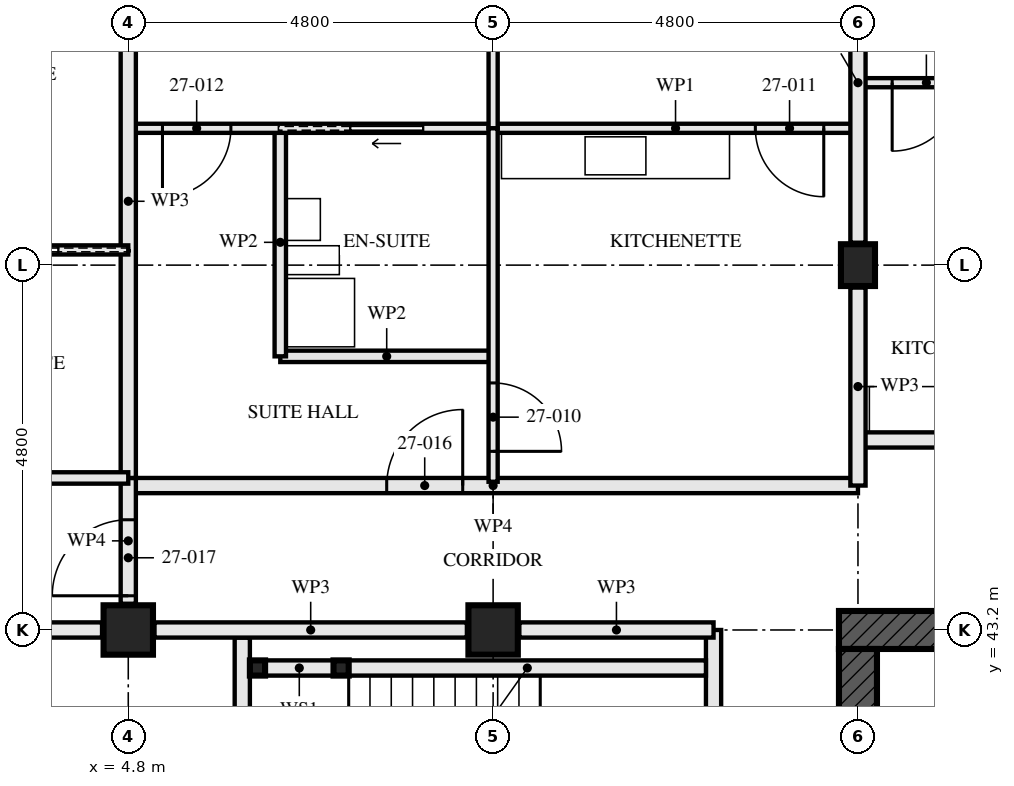
"""IFC4 building model, lengths in metres.
Left out: names, types, materials, properties, quantities, classifications, styles, units other than length and angle.
Written with IfcOpenShell. Run it as: python <this file> out.ifc"""

import sys

from ifc_helpers import new_model, si_unit, direction, frame, frame_2d, origin, origin_2d, place, context, subcontext, project, spatial, rectangle, hollow_rectangle, i_section, extrude, element, fill, save


model = new_model("IFC4")
c1 = context("Model", 3, precision=1e-05, world=origin(), true_north=direction((0.0, 1.0)))
c2 = subcontext(c1, "Body", "Model", "MODEL_VIEW")
j1 = project(units=[si_unit("LENGTHUNIT", "METRE"), si_unit("PLANEANGLEUNIT", "RADIAN")], contexts=[c1])
p1 = place(None, origin())
s1 = spatial("IfcSite", under=j1, at=p1, CompositionType="ELEMENT")
p2 = place(p1, origin())
s2 = spatial("IfcBuilding", under=s1, at=p2, CompositionType="ELEMENT")
p3 = place(p2, frame((0.0, 0.0, 101.5)))
s3 = spatial("IfcBuildingStorey", under=s2, at=p3, CompositionType="ELEMENT", Elevation=101.5)
for number, where, z_axis, x_axis in (
    (1, (4.8, 43.2, 0.0), (0.0, 0.0, 1.0), (0.0, 1.0, 0.0)),
    (2, (9.6, 43.2, 0.0), (0.0, 0.0, 1.0), (0.0, 1.0, 0.0)),
):
    element("IfcColumn", number, at=place(p3, frame(where, z_axis=z_axis, x_axis=x_axis)), inside=s3, PredefinedType="COLUMN", context=c2, shape_type="SweptSolid", body=[
        extrude(hollow_rectangle(XDim=0.65, YDim=0.65, WallThickness=0.05, at=origin_2d()), origin(), (0.0, 0.0, 1.0), 3.5),
    ])
p4 = place(p3, frame((14.4, 48.0, 0.0), z_axis=(0.0, 0.0, 1.0), x_axis=(1.0, 0.0, 0.0)))
e3 = element("IfcColumn", 3, at=p4, inside=s3, PredefinedType="COLUMN", context=c2, shape_type="SweptSolid", body=[
    extrude(i_section(OverallWidth=0.448, OverallDepth=0.55, WebThickness=0.072, FlangeThickness=0.115, FilletRadius=0.015, at=origin_2d()), origin(), (0.0, 0.0, 1.0), 3.5),
])
p5 = place(p3, frame((29.05, 43.2, -0.17), z_axis=(0.0, 0.0, 1.0), x_axis=(-1.0, 0.0, 0.0)))
e4 = element("IfcWall", 4, at=p5, inside=s3, PredefinedType="SHEAR", context=c2, shape_type="SweptSolid", body=[
    extrude(rectangle(XDim=14.9, YDim=0.5, at=frame_2d((7.45, 0.0))), origin(), (0.0, 0.0, 1.0), 3.5),
])
p6 = place(p5, frame((6.85, 0.0, 0.17)))
e5 = element("IfcOpeningElement", 5, at=p6, cuts=e4, PredefinedType="OPENING", context=c2, shape_type="SweptSolid", body=[
    extrude(rectangle(XDim=1.2, YDim=2.1, at=frame_2d((0.6, 1.05))), frame((0.0, 0.26, 0.0), z_axis=(0.0, -1.0, 0.0), x_axis=(1.0, 0.0, 0.0)), (0.0, 0.0, 1.0), 0.521),
])
p7 = place(p3, frame((14.4, 42.95, -0.17), z_axis=(0.0, 0.0, 1.0), x_axis=(0.0, -1.0, 0.0)))
e6 = element("IfcWall", 6, at=p7, inside=s3, PredefinedType="SHEAR", context=c2, shape_type="SweptSolid", body=[
    extrude(rectangle(XDim=13.9, YDim=0.5, at=frame_2d((6.95, 0.0))), origin(), (0.0, 0.0, 1.0), 3.5),
])
p8 = place(p7, frame((6.35, 0.0, 0.17)))
e7 = element("IfcOpeningElement", 7, at=p8, cuts=e6, PredefinedType="OPENING", context=c2, shape_type="SweptSolid", body=[
    extrude(rectangle(XDim=1.2, YDim=2.1, at=frame_2d((0.6, 1.05))), frame((0.0, 0.26, 0.0), z_axis=(0.0, -1.0, 0.0), x_axis=(1.0, 0.0, 0.0)), (0.0, 0.0, 1.0), 0.521),
])
for number, where, z_axis, x_axis in (
    (8, (6.5, 42.7, 0.0), (0.0, 0.0, 1.0), (1.0, 0.0, 0.0)),
    (9, (7.6, 42.7, 0.0), (0.0, 0.0, 1.0), (1.0, 0.0, 0.0)),
):
    element("IfcColumn", number, at=place(p3, frame(where, z_axis=z_axis, x_axis=x_axis)), inside=s3, PredefinedType="COLUMN", context=c2, shape_type="SweptSolid", body=[
        extrude(hollow_rectangle(XDim=0.2, YDim=0.2, WallThickness=0.008, at=origin_2d()), origin(), (0.0, 0.0, 1.0), 3.33),
    ])
p9 = place(p3, frame((6.6, 42.7, 0.0), z_axis=(0.0, 0.0, 1.0), x_axis=(1.0, 0.0, 0.0)))
e10 = element("IfcWall", 10, at=p9, inside=s3, PredefinedType="SOLIDWALL", context=c2, shape_type="SweptSolid", body=[
    extrude(rectangle(XDim=0.9, YDim=0.2, at=frame_2d((0.45, 0.0))), origin(), (0.0, 0.0, 1.0), 2.99),
])
p10 = place(p3, frame((7.7, 42.7, 0.0), z_axis=(0.0, 0.0, 1.0), x_axis=(1.0, 0.0, 0.0)))
e11 = element("IfcWall", 11, at=p10, inside=s3, PredefinedType="SOLIDWALL", context=c2, shape_type="SweptSolid", body=[
    extrude(rectangle(XDim=4.7, YDim=0.2, at=frame_2d((2.35, 0.0))), origin(), (0.0, 0.0, 1.0), 2.99),
])
p11 = place(p3, frame((6.3, 43.1, 0.0), z_axis=(0.0, 0.0, 1.0), x_axis=(0.0, -1.0, 0.0)))
e12 = element("IfcWall", 12, at=p11, inside=s3, PredefinedType="SOLIDWALL", context=c2, shape_type="SweptSolid", body=[
    extrude(rectangle(XDim=3.3, YDim=0.2, at=frame_2d((1.65, 0.0))), origin(), (0.0, 0.0, 1.0), 3.33),
])
p12 = place(p3, frame((12.5, 43.2, 0.0), z_axis=(0.0, 0.0, 1.0), x_axis=(0.0, -1.0, 0.0)))
e13 = element("IfcWall", 13, at=p12, inside=s3, PredefinedType="PARTITIONING", context=c2, shape_type="SweptSolid", body=[
    extrude(rectangle(XDim=14.84, YDim=0.2, at=frame_2d((7.42, 0.0))), origin(), (0.0, 0.0, 1.0), 2.32),
])
p13 = place(p12, frame((1.4, 0.0, 0.0)))
e14 = element("IfcOpeningElement", 14, at=p13, cuts=e13, PredefinedType="OPENING", context=c2, shape_type="SweptSolid", body=[
    extrude(rectangle(XDim=1.0, YDim=2.1, at=frame_2d((0.5, 1.05))), frame((0.0, 0.111, 0.0), z_axis=(0.0, -1.0, 0.0), x_axis=(1.0, 0.0, 0.0)), (0.0, 0.0, 1.0), 0.221),
])
p14 = place(p12, frame((5.2, 0.0, 0.0)))
e15 = element("IfcOpeningElement", 15, at=p14, cuts=e13, PredefinedType="OPENING", context=c2, shape_type="SweptSolid", body=[
    extrude(rectangle(XDim=1.0, YDim=2.1, at=frame_2d((0.5, 1.05))), frame((0.0, 0.111, 0.0), z_axis=(0.0, -1.0, 0.0), x_axis=(1.0, 0.0, 0.0)), (0.0, 0.0, 1.0), 0.221),
])
p15 = place(p12, frame((13.0, 0.0, 0.0)))
e16 = element("IfcOpeningElement", 16, at=p15, cuts=e13, PredefinedType="OPENING", context=c2, shape_type="SweptSolid", body=[
    extrude(rectangle(XDim=1.0, YDim=2.1, at=frame_2d((0.5, 1.05))), frame((0.0, 0.111, 0.0), z_axis=(0.0, -1.0, 0.0), x_axis=(1.0, 0.0, 0.0)), (0.0, 0.0, 1.0), 0.221),
])
p16 = place(p3, frame((6.8, 49.8, 0.0), z_axis=(0.0, 0.0, 1.0), x_axis=(0.0, -1.0, 0.0)))
e17 = element("IfcWall", 17, at=p16, inside=s3, PredefinedType="PARTITIONING", context=c2, shape_type="SweptSolid", body=[
    extrude(rectangle(XDim=3.0, YDim=0.15, at=frame_2d((1.5, 0.0))), origin(), (0.0, 0.0, 1.0), 2.55),
])
p17 = place(p3, frame((9.6, 46.8, 0.0), z_axis=(0.0, 0.0, 1.0), x_axis=(-1.0, 0.0, 0.0)))
e18 = element("IfcWall", 18, at=p17, inside=s3, PredefinedType="PARTITIONING", context=c2, shape_type="SweptSolid", body=[
    extrude(rectangle(XDim=2.8, YDim=0.15, at=frame_2d((1.4, 0.0))), origin(), (0.0, 0.0, 1.0), 3.33),
])
p18 = place(p3, frame((9.6, 49.8, 0.0), z_axis=(0.0, 0.0, 1.0), x_axis=(0.0, -1.0, 0.0)))
e19 = element("IfcWall", 19, at=p18, inside=s3, PredefinedType="PARTITIONING", context=c2, shape_type="SweptSolid", body=[
    extrude(rectangle(XDim=4.65, YDim=0.12, at=frame_2d((2.325, 0.0))), origin(), (0.0, 0.0, 1.0), 2.55),
])
p19 = place(p18, frame((3.35, 0.0, 0.0)))
e20 = element("IfcOpeningElement", 20, at=p19, cuts=e19, PredefinedType="OPENING", context=c2, shape_type="SweptSolid", body=[
    extrude(rectangle(XDim=0.9, YDim=2.1, at=frame_2d((0.45, 1.05))), frame((0.0, 0.071, 0.0), z_axis=(0.0, -1.0, 0.0), x_axis=(1.0, 0.0, 0.0)), (0.0, 0.0, 1.0), 0.141),
])
p20 = place(p3, frame((14.4, 49.8, 0.0), z_axis=(0.0, 0.0, 1.0), x_axis=(-1.0, 0.0, 0.0)))
e21 = element("IfcWall", 21, at=p20, inside=s3, PredefinedType="PARTITIONING", context=c2, shape_type="SweptSolid", body=[
    extrude(rectangle(XDim=4.8, YDim=0.12, at=frame_2d((2.4, 0.0))), origin(), (0.0, 0.0, 1.0), 3.33),
])
p21 = place(p20, frame((0.45, 0.0, 0.0)))
e22 = element("IfcOpeningElement", 22, at=p21, cuts=e21, PredefinedType="OPENING", context=c2, shape_type="SweptSolid", body=[
    extrude(rectangle(XDim=0.9, YDim=2.1, at=frame_2d((0.45, 1.05))), frame((0.0, 0.071, 0.0), z_axis=(0.0, -1.0, 0.0), x_axis=(1.0, 0.0, 0.0)), (0.0, 0.0, 1.0), 0.141),
])
p22 = place(p3, frame((9.6, 49.8, 0.0), z_axis=(0.0, 0.0, 1.0), x_axis=(-1.0, 0.0, 0.0)))
e23 = element("IfcWall", 23, at=p22, inside=s3, PredefinedType="PARTITIONING", context=c2, shape_type="SweptSolid", body=[
    extrude(rectangle(XDim=4.8, YDim=0.12, at=frame_2d((2.4, 0.0))), origin(), (0.0, 0.0, 1.0), 3.33),
])
p23 = place(p22, frame((3.45, 0.0, 0.0)))
e24 = element("IfcOpeningElement", 24, at=p23, cuts=e23, PredefinedType="OPENING", context=c2, shape_type="SweptSolid", body=[
    extrude(rectangle(XDim=0.9, YDim=2.1, at=frame_2d((0.45, 1.05))), frame((0.0, 0.071, 0.0), z_axis=(0.0, -1.0, 0.0), x_axis=(1.0, 0.0, 0.0)), (0.0, 0.0, 1.0), 0.141),
])
p24 = place(p22, frame((0.925, 0.0, 0.0)))
e25 = element("IfcOpeningElement", 25, at=p24, cuts=e23, PredefinedType="OPENING", context=c2, shape_type="SweptSolid", body=[
    extrude(rectangle(XDim=0.95, YDim=2.1, at=frame_2d((0.475, 1.05))), frame((0.0, 0.071, 0.0), z_axis=(0.0, -1.0, 0.0), x_axis=(1.0, 0.0, 0.0)), (0.0, 0.0, 1.0), 0.141),
])
p25 = place(p3, frame((9.6, 57.353, 0.0), z_axis=(0.0, 0.0, 1.0), x_axis=(0.0, -1.0, 0.0)))
e26 = element("IfcWall", 26, at=p25, inside=s3, PredefinedType="PARTITIONING", context=c2, shape_type="SweptSolid", body=[
    extrude(rectangle(XDim=7.553, YDim=0.12, at=frame_2d((3.776, 0.0))), origin(), (0.0, 0.0, 1.0), 2.55),
])
p26 = place(p3, frame((4.8, 52.48, 0.0), z_axis=(0.0, 0.0, 1.0), x_axis=(0.0, -1.0, 0.0)))
e27 = element("IfcWall", 27, at=p26, inside=s3, PredefinedType="PARTITIONING", context=c2, shape_type="SweptSolid", body=[
    extrude(rectangle(XDim=7.28, YDim=0.2, at=frame_2d((3.64, 0.0))), origin(), (0.0, 0.0, 1.0), 2.55),
])
p27 = place(p3, frame((4.8, 45.2, 0.0), z_axis=(0.0, 0.0, 1.0), x_axis=(-1.0, 0.0, 0.0)))
e28 = element("IfcWall", 28, at=p27, inside=s3, PredefinedType="PARTITIONING", context=c2, shape_type="SweptSolid", body=[
    extrude(rectangle(XDim=2.8, YDim=0.15, at=frame_2d((1.4, 0.0))), origin(), (0.0, 0.0, 1.0), 3.33),
])
p28 = place(p3, frame((4.8, 48.2, 0.0), z_axis=(0.0, 0.0, 1.0), x_axis=(-1.0, 0.0, 0.0)))
e29 = element("IfcWall", 29, at=p28, inside=s3, PredefinedType="PARTITIONING", context=c2, shape_type="SweptSolid", body=[
    extrude(rectangle(XDim=4.553, YDim=0.12, at=frame_2d((2.276, 0.0))), origin(), (0.0, 0.0, 1.0), 3.33),
])
p29 = place(p28, frame((2.975, 0.0, 0.0)))
e30 = element("IfcOpeningElement", 30, at=p29, cuts=e29, PredefinedType="OPENING", context=c2, shape_type="SweptSolid", body=[
    extrude(rectangle(XDim=0.9, YDim=2.1, at=frame_2d((0.45, 1.05))), frame((0.0, 0.071, 0.0), z_axis=(0.0, -1.0, 0.0), x_axis=(1.0, 0.0, 0.0)), (0.0, 0.0, 1.0), 0.141),
])
p30 = place(p28, frame((0.925, 0.0, 0.0)))
e31 = element("IfcOpeningElement", 31, at=p30, cuts=e29, PredefinedType="OPENING", context=c2, shape_type="SweptSolid", body=[
    extrude(rectangle(XDim=0.95, YDim=2.1, at=frame_2d((0.475, 1.05))), frame((0.0, 0.071, 0.0), z_axis=(0.0, -1.0, 0.0), x_axis=(1.0, 0.0, 0.0)), (0.0, 0.0, 1.0), 0.141),
])
p31 = place(p3, frame((14.4, 45.1, 0.0), z_axis=(0.0, 0.0, 1.0), x_axis=(-1.0, 0.0, 0.0)))
e32 = element("IfcWall", 32, at=p31, inside=s3, PredefinedType="PARTITIONING", context=c2, shape_type="SweptSolid", body=[
    extrude(rectangle(XDim=9.6, YDim=0.2, at=frame_2d((4.8, 0.0))), origin(), (0.0, 0.0, 1.0), 3.33),
])
p32 = place(p31, frame((5.2, 0.0, 0.0)))
e33 = element("IfcOpeningElement", 33, at=p32, cuts=e32, PredefinedType="OPENING", context=c2, shape_type="SweptSolid", body=[
    extrude(rectangle(XDim=1.0, YDim=2.1, at=frame_2d((0.5, 1.05))), frame((0.0, 0.111, 0.0), z_axis=(0.0, -1.0, 0.0), x_axis=(1.0, 0.0, 0.0)), (0.0, 0.0, 1.0), 0.221),
])
p33 = place(p3, frame((4.8, 45.2, 0.0), z_axis=(0.0, 0.0, 1.0), x_axis=(0.0, -1.0, 0.0)))
e34 = element("IfcWall", 34, at=p33, inside=s3, PredefinedType="PARTITIONING", context=c2, shape_type="SweptSolid", body=[
    extrude(rectangle(XDim=1.655, YDim=0.2, at=frame_2d((0.828, 0.0))), origin(), (0.0, 0.0, 1.0), 3.33),
])
p34 = place(p33, frame((0.55, 0.0, 0.0)))
e35 = element("IfcOpeningElement", 35, at=p34, cuts=e34, PredefinedType="OPENING", context=c2, shape_type="SweptSolid", body=[
    extrude(rectangle(XDim=1.0, YDim=2.1, at=frame_2d((0.5, 1.05))), frame((0.0, 0.111, 0.0), z_axis=(0.0, -1.0, 0.0), x_axis=(1.0, 0.0, 0.0)), (0.0, 0.0, 1.0), 0.221),
])
p35 = place(p3, frame((19.2, 50.4, 0.0), z_axis=(0.0, 0.0, 1.0), x_axis=(-1.0, 0.0, 0.0)))
e36 = element("IfcWall", 36, at=p35, inside=s3, PredefinedType="PARTITIONING", context=c2, shape_type="SweptSolid", body=[
    extrude(rectangle(XDim=4.8, YDim=0.12, at=frame_2d((2.4, 0.0))), origin(), (0.0, 0.0, 1.0), 3.33),
])
p36 = place(p35, frame((3.45, 0.0, 0.0)))
e37 = element("IfcOpeningElement", 37, at=p36, cuts=e36, PredefinedType="OPENING", context=c2, shape_type="SweptSolid", body=[
    extrude(rectangle(XDim=0.9, YDim=2.1, at=frame_2d((0.45, 1.05))), frame((0.0, 0.071, 0.0), z_axis=(0.0, -1.0, 0.0), x_axis=(1.0, 0.0, 0.0)), (0.0, 0.0, 1.0), 0.141),
])
p37 = place(p35, frame((0.925, 0.0, 0.0)))
e38 = element("IfcOpeningElement", 38, at=p37, cuts=e36, PredefinedType="OPENING", context=c2, shape_type="SweptSolid", body=[
    extrude(rectangle(XDim=0.95, YDim=2.1, at=frame_2d((0.475, 1.05))), frame((0.0, 0.071, 0.0), z_axis=(0.0, -1.0, 0.0), x_axis=(1.0, 0.0, 0.0)), (0.0, 0.0, 1.0), 0.141),
])
p38 = place(p3, frame((29.24, 45.7, 0.0), z_axis=(0.0, 0.0, 1.0), x_axis=(-1.0, 0.0, 0.0)))
e39 = element("IfcWall", 39, at=p38, inside=s3, PredefinedType="PARTITIONING", context=c2, shape_type="SweptSolid", body=[
    extrude(rectangle(XDim=14.84, YDim=0.2, at=frame_2d((7.42, 0.0))), origin(), (0.0, 0.0, 1.0), 2.32),
])
p39 = place(p38, frame((0.84, 0.0, 0.0)))
e40 = element("IfcOpeningElement", 40, at=p39, cuts=e39, PredefinedType="OPENING", context=c2, shape_type="SweptSolid", body=[
    extrude(rectangle(XDim=1.0, YDim=2.1, at=frame_2d((0.5, 1.05))), frame((0.0, 0.111, 0.0), z_axis=(0.0, -1.0, 0.0), x_axis=(1.0, 0.0, 0.0)), (0.0, 0.0, 1.0), 0.221),
])
p40 = place(p38, frame((5.64, 0.0, 0.0)))
e41 = element("IfcOpeningElement", 41, at=p40, cuts=e39, PredefinedType="OPENING", context=c2, shape_type="SweptSolid", body=[
    extrude(rectangle(XDim=1.0, YDim=2.1, at=frame_2d((0.5, 1.05))), frame((0.0, 0.111, 0.0), z_axis=(0.0, -1.0, 0.0), x_axis=(1.0, 0.0, 0.0)), (0.0, 0.0, 1.0), 0.221),
])
p41 = place(p38, frame((10.44, 0.0, 0.0)))
e42 = element("IfcOpeningElement", 42, at=p41, cuts=e39, PredefinedType="OPENING", context=c2, shape_type="SweptSolid", body=[
    extrude(rectangle(XDim=1.0, YDim=2.1, at=frame_2d((0.5, 1.05))), frame((0.0, 0.111, 0.0), z_axis=(0.0, -1.0, 0.0), x_axis=(1.0, 0.0, 0.0)), (0.0, 0.0, 1.0), 0.221),
])
p42 = place(p3, frame((12.5, 43.2, 0.0), z_axis=(0.0, 0.0, 1.0), x_axis=(-1.0, 0.0, 0.0)))
e43 = element("IfcWall", 43, at=p42, inside=s3, PredefinedType="PARTITIONING", context=c2, shape_type="SweptSolid", body=[
    extrude(rectangle(XDim=2.555, YDim=0.2, at=frame_2d((1.277, 0.0))), origin(), (0.0, 0.0, 1.0), 2.32),
])
p43 = place(p3, frame((9.255, 43.2, 0.0), z_axis=(0.0, 0.0, 1.0), x_axis=(-1.0, 0.0, 0.0)))
e44 = element("IfcWall", 44, at=p43, inside=s3, PredefinedType="PARTITIONING", context=c2, shape_type="SweptSolid", body=[
    extrude(rectangle(XDim=4.11, YDim=0.2, at=frame_2d((2.055, 0.0))), origin(), (0.0, 0.0, 1.0), 2.32),
])
p44 = place(p3, frame((4.455, 43.2, 0.0), z_axis=(0.0, 0.0, 1.0), x_axis=(-1.0, 0.0, 0.0)))
e45 = element("IfcWall", 45, at=p44, inside=s3, PredefinedType="PARTITIONING", context=c2, shape_type="SweptSolid", body=[
    extrude(rectangle(XDim=4.151, YDim=0.2, at=frame_2d((2.075, 0.0))), origin(), (0.0, 0.0, 1.0), 2.32),
])
p45 = place(p3, frame((14.4, 45.1, 0.0), z_axis=(0.0, 0.0, 1.0), x_axis=(0.0, 1.0, 0.0)))
e46 = element("IfcWall", 46, at=p45, inside=s3, PredefinedType="PARTITIONING", context=c2, shape_type="SweptSolid", body=[
    extrude(rectangle(XDim=2.605, YDim=0.2, at=frame_2d((1.302, 0.0))), origin(), (0.0, 0.0, 1.0), 2.32),
])
p46 = place(p3, frame((14.4, 48.295, 0.0), z_axis=(0.0, 0.0, 1.0), x_axis=(0.0, 1.0, 0.0)))
e47 = element("IfcWall", 47, at=p46, inside=s3, PredefinedType="PARTITIONING", context=c2, shape_type="SweptSolid", body=[
    extrude(rectangle(XDim=4.21, YDim=0.2, at=frame_2d((2.105, 0.0))), origin(), (0.0, 0.0, 1.0), 2.32),
])
p47 = place(p19, origin())
e48 = element("IfcDoor", 48, at=p47, inside=s3, OperationType="SINGLE_SWING_LEFT", PredefinedType="DOOR", context=c2, shape_type="SweptSolid", body=[
    extrude(rectangle(XDim=0.9, YDim=2.1, at=frame_2d((0.45, 1.05))), frame((0.0, 0.022, 0.0), z_axis=(0.0, -1.0, 0.0), x_axis=(1.0, 0.0, 0.0)), (0.0, 0.0, 1.0), 0.044),
])
fill(e20, e48)
p48 = place(p21, origin())
e49 = element("IfcDoor", 49, at=p48, inside=s3, OperationType="SINGLE_SWING_RIGHT", PredefinedType="DOOR", context=c2, shape_type="SweptSolid", body=[
    extrude(rectangle(XDim=0.9, YDim=2.1, at=frame_2d((0.45, 1.05))), frame((0.0, 0.022, 0.0), z_axis=(0.0, -1.0, 0.0), x_axis=(1.0, 0.0, 0.0)), (0.0, 0.0, 1.0), 0.044),
])
fill(e22, e49)
p49 = place(p23, origin())
e50 = element("IfcDoor", 50, at=p49, inside=s3, OperationType="SINGLE_SWING_LEFT", PredefinedType="DOOR", context=c2, shape_type="SweptSolid", body=[
    extrude(rectangle(XDim=0.9, YDim=2.1, at=frame_2d((0.45, 1.05))), frame((0.0, 0.022, 0.0), z_axis=(0.0, -1.0, 0.0), x_axis=(1.0, 0.0, 0.0)), (0.0, 0.0, 1.0), 0.044),
])
fill(e24, e50)
p50 = place(p24, origin())
e51 = element("IfcDoor", 51, at=p50, inside=s3, OperationType="SLIDING_TO_LEFT", PredefinedType="DOOR", context=c2, shape_type="SweptSolid", body=[
    extrude(rectangle(XDim=0.95, YDim=2.1, at=frame_2d((0.475, 1.05))), frame((0.0, 0.022, 0.0), z_axis=(0.0, -1.0, 0.0), x_axis=(1.0, 0.0, 0.0)), (0.0, 0.0, 1.0), 0.044),
])
fill(e25, e51)
p51 = place(p30, origin())
e52 = element("IfcDoor", 52, at=p51, inside=s3, OperationType="SLIDING_TO_RIGHT", PredefinedType="DOOR", context=c2, shape_type="SweptSolid", body=[
    extrude(rectangle(XDim=0.95, YDim=2.1, at=frame_2d((0.475, 1.05))), frame((0.0, 0.022, 0.0), z_axis=(0.0, -1.0, 0.0), x_axis=(1.0, 0.0, 0.0)), (0.0, 0.0, 1.0), 0.044),
])
fill(e31, e52)
p52 = place(p32, frame((1.0, 0.0, 0.0), z_axis=(0.0, 0.0, 1.0), x_axis=(-1.0, 0.0, 0.0)))
e53 = element("IfcDoor", 53, at=p52, inside=s3, OperationType="SINGLE_SWING_LEFT", PredefinedType="DOOR", context=c2, shape_type="SweptSolid", body=[
    extrude(rectangle(XDim=1.0, YDim=2.1, at=frame_2d((0.5, 1.05))), frame((0.0, 0.027, 0.0), z_axis=(0.0, -1.0, 0.0), x_axis=(1.0, 0.0, 0.0)), (0.0, 0.0, 1.0), 0.054),
])
fill(e33, e53)
p53 = place(p34, frame((1.0, 0.0, 0.0), z_axis=(0.0, 0.0, 1.0), x_axis=(-1.0, 0.0, 0.0)))
e54 = element("IfcDoor", 54, at=p53, inside=s3, OperationType="SINGLE_SWING_RIGHT", PredefinedType="DOOR", context=c2, shape_type="SweptSolid", body=[
    extrude(rectangle(XDim=1.0, YDim=2.1, at=frame_2d((0.5, 1.05))), frame((0.0, 0.027, 0.0), z_axis=(0.0, -1.0, 0.0), x_axis=(1.0, 0.0, 0.0)), (0.0, 0.0, 1.0), 0.054),
])
fill(e35, e54)
p54 = place(p36, origin())
e55 = element("IfcDoor", 55, at=p54, inside=s3, OperationType="SINGLE_SWING_LEFT", PredefinedType="DOOR", context=c2, shape_type="SweptSolid", body=[
    extrude(rectangle(XDim=0.9, YDim=2.1, at=frame_2d((0.45, 1.05))), frame((0.0, 0.022, 0.0), z_axis=(0.0, -1.0, 0.0), x_axis=(1.0, 0.0, 0.0)), (0.0, 0.0, 1.0), 0.044),
])
fill(e37, e55)
save(model, sys.argv[1])
